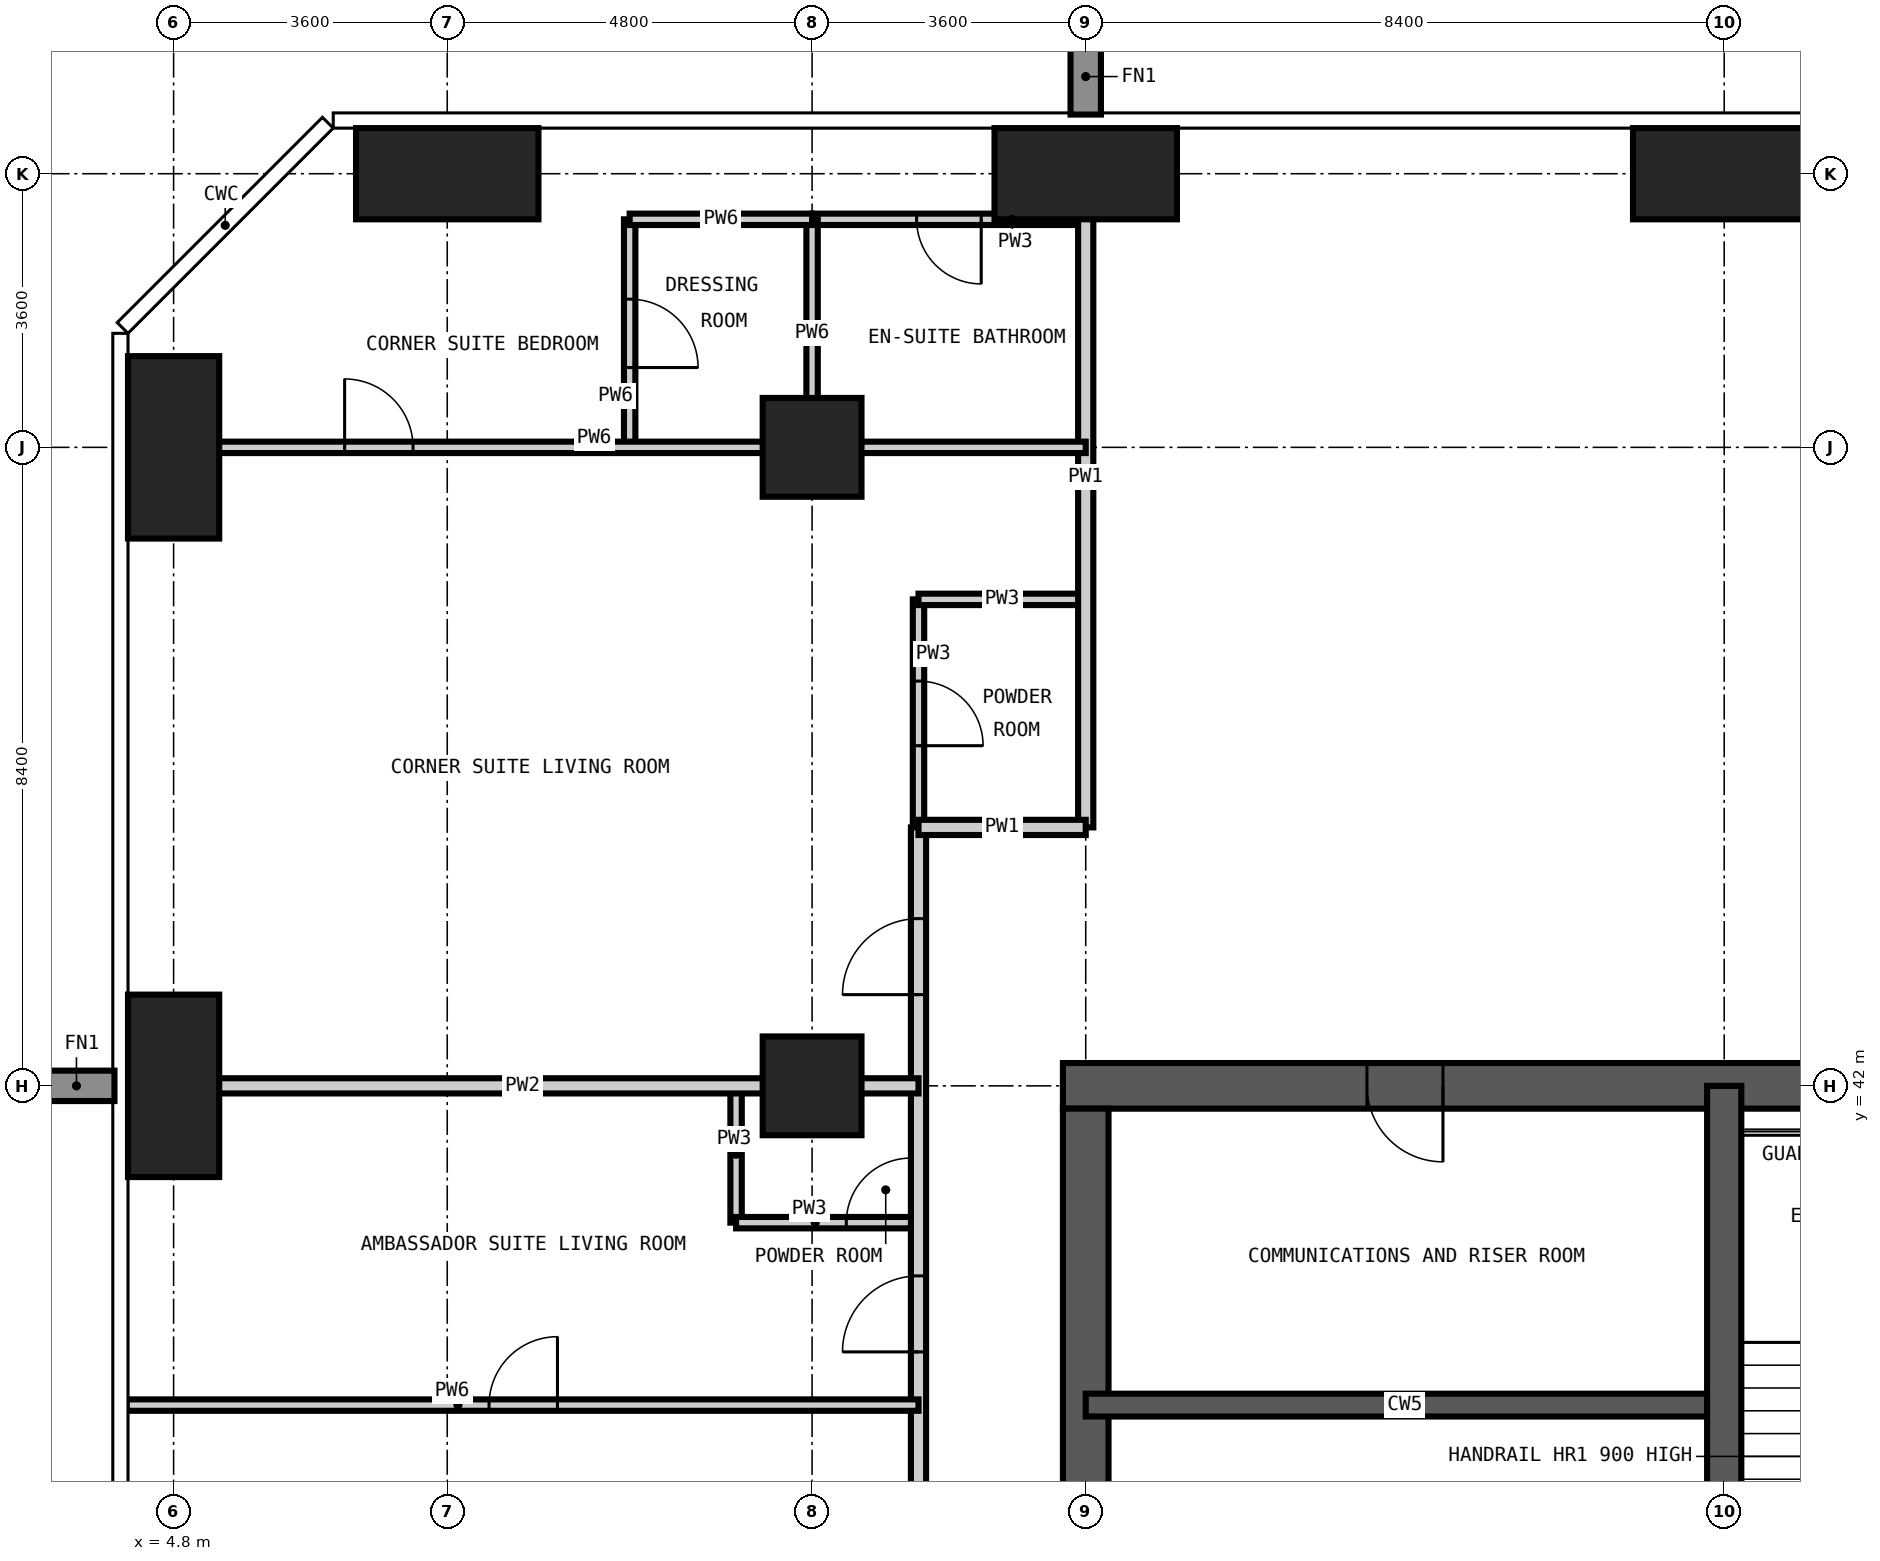
"""IFC4 building model, lengths in metres.
Left out: names, types, materials, properties, quantities, classifications, styles, units other than length and angle.
Written with IfcOpenShell. Run it as: python <this file> out.ifc"""

import sys

from ifc_helpers import new_model, si_unit, direction, frame, frame_2d, origin, origin_2d, place, context, subcontext, project, spatial, rectangle, extrude, element, fill, save


model = new_model("IFC4")
c1 = context("Model", 3, precision=1e-05, world=origin(), true_north=direction((0.0, 1.0)))
c2 = subcontext(c1, "Body", "Model", "MODEL_VIEW")
j1 = project(units=[si_unit("LENGTHUNIT", "METRE"), si_unit("PLANEANGLEUNIT", "RADIAN")], contexts=[c1])
p1 = place(None, origin())
s1 = spatial("IfcSite", under=j1, at=p1, CompositionType="ELEMENT")
p2 = place(p1, origin())
s2 = spatial("IfcBuilding", under=s1, at=p2, CompositionType="ELEMENT")
p3 = place(p2, frame((0.0, 0.0, 205.8)))
s3 = spatial("IfcBuildingStorey", under=s2, at=p3, CompositionType="ELEMENT", Elevation=205.8)
for number, where, z_axis, x_axis in (
    (1, (4.8, 42.0, -0.35), (0.0, 0.0, 1.0), (1.0, 0.0, 0.0)),
    (2, (4.8, 50.4, -0.35), (0.0, 0.0, 1.0), (1.0, 0.0, 0.0)),
):
    element("IfcColumn", number, at=place(p3, frame(where, z_axis=z_axis, x_axis=x_axis)), inside=s3, PredefinedType="COLUMN", context=c2, shape_type="SweptSolid", body=[
        extrude(rectangle(XDim=1.2, YDim=2.4, at=origin_2d()), origin(), (0.0, 0.0, 1.0), 3.6),
    ])
p4 = place(p3, frame((8.4, 54.0, -0.35), z_axis=(0.0, 0.0, 1.0), x_axis=(1.0, 0.0, 0.0)))
e3 = element("IfcColumn", 3, at=p4, inside=s3, PredefinedType="COLUMN", context=c2, shape_type="SweptSolid", body=[
    extrude(rectangle(XDim=2.4, YDim=1.2, at=origin_2d()), origin(), (0.0, 0.0, 1.0), 3.6),
])
for number, where, z_axis, x_axis in (
    (4, (13.2, 42.0, -0.35), (0.0, 0.0, 1.0), (1.0, 0.0, 0.0)),
    (5, (13.2, 50.4, -0.35), (0.0, 0.0, 1.0), (1.0, 0.0, 0.0)),
):
    element("IfcColumn", number, at=place(p3, frame(where, z_axis=z_axis, x_axis=x_axis)), inside=s3, PredefinedType="COLUMN", context=c2, shape_type="SweptSolid", body=[
        extrude(rectangle(XDim=1.3, YDim=1.3, at=origin_2d()), origin(), (0.0, 0.0, 1.0), 3.6),
    ])
for number, where, z_axis, x_axis in (
    (6, (16.8, 54.0, -0.35), (0.0, 0.0, 1.0), (1.0, 0.0, 0.0)),
    (7, (25.2, 54.0, -0.35), (0.0, 0.0, 1.0), (1.0, 0.0, 0.0)),
):
    element("IfcColumn", number, at=place(p3, frame(where, z_axis=z_axis, x_axis=x_axis)), inside=s3, PredefinedType="COLUMN", context=c2, shape_type="SweptSolid", body=[
        extrude(rectangle(XDim=2.4, YDim=1.2, at=origin_2d()), origin(), (0.0, 0.0, 1.0), 3.6),
    ])
p5 = place(p3, frame((42.3, 42.0, -0.35), z_axis=(0.0, 0.0, 1.0), x_axis=(-1.0, 0.0, 0.0)))
e8 = element("IfcWall", 8, at=p5, inside=s3, PredefinedType="SHEAR", context=c2, shape_type="SweptSolid", body=[
    extrude(rectangle(XDim=25.8, YDim=0.6, at=frame_2d((12.9, 0.0))), origin(), (0.0, 0.0, 1.0), 3.6),
])
p6 = place(p5, frame((20.8, 0.0, 0.35)))
e9 = element("IfcOpeningElement", 9, at=p6, cuts=e8, PredefinedType="OPENING", context=c2, shape_type="SweptSolid", body=[
    extrude(rectangle(XDim=1.0, YDim=2.1, at=frame_2d((0.5, 1.05))), frame((0.0, 0.31, 0.0), z_axis=(0.0, -1.0, 0.0), x_axis=(1.0, 0.0, 0.0)), (0.0, 0.0, 1.0), 0.62),
])
p7 = place(p5, frame((10.2, 0.0, 0.35)))
e10 = element("IfcOpeningElement", 10, at=p7, cuts=e8, PredefinedType="OPENING", context=c2, shape_type="SweptSolid", body=[
    extrude(rectangle(XDim=1.2, YDim=2.2, at=frame_2d((0.6, 1.1))), frame((0.0, 0.31, 0.0), z_axis=(0.0, -1.0, 0.0), x_axis=(1.0, 0.0, 0.0)), (0.0, 0.0, 1.0), 0.62),
])
p8 = place(p3, frame((16.8, 41.7, -0.35), z_axis=(0.0, 0.0, 1.0), x_axis=(0.0, -1.0, 0.0)))
e11 = element("IfcWall", 11, at=p8, inside=s3, PredefinedType="SHEAR", context=c2, shape_type="SweptSolid", body=[
    extrude(rectangle(XDim=24.6, YDim=0.6, at=frame_2d((12.3, 0.0))), origin(), (0.0, 0.0, 1.0), 3.6),
])
p9 = place(p8, frame((11.4, 0.0, 0.35)))
e12 = element("IfcOpeningElement", 12, at=p9, cuts=e11, PredefinedType="OPENING", context=c2, shape_type="SweptSolid", body=[
    extrude(rectangle(XDim=1.8, YDim=2.2, at=frame_2d((0.9, 1.1))), frame((0.0, 0.31, 0.0), z_axis=(0.0, -1.0, 0.0), x_axis=(1.0, 0.0, 0.0)), (0.0, 0.0, 1.0), 0.62),
])
p10 = place(p8, frame((20.2, 0.0, 0.35)))
e13 = element("IfcOpeningElement", 13, at=p10, cuts=e11, PredefinedType="OPENING", context=c2, shape_type="SweptSolid", body=[
    extrude(rectangle(XDim=1.0, YDim=2.1, at=frame_2d((0.5, 1.05))), frame((0.0, 0.31, 0.0), z_axis=(0.0, -1.0, 0.0), x_axis=(1.0, 0.0, 0.0)), (0.0, 0.0, 1.0), 0.62),
])
p11 = place(p8, frame((5.5, 0.0, 0.35)))
e14 = element("IfcOpeningElement", 14, at=p11, cuts=e11, PredefinedType="OPENING", context=c2, shape_type="SweptSolid", body=[
    extrude(rectangle(XDim=1.0, YDim=2.1, at=frame_2d((0.5, 1.05))), frame((0.0, 0.31, 0.0), z_axis=(0.0, -1.0, 0.0), x_axis=(1.0, 0.0, 0.0)), (0.0, 0.0, 1.0), 0.62),
])
p12 = place(p3, frame((16.8, 37.8, -0.35), z_axis=(0.0, 0.0, 1.0), x_axis=(1.0, 0.0, 0.0)))
e15 = element("IfcWall", 15, at=p12, inside=s3, PredefinedType="SHEAR", context=c2, shape_type="SweptSolid", body=[
    extrude(rectangle(XDim=8.4, YDim=0.3, at=frame_2d((4.2, 0.0))), origin(), (0.0, 0.0, 1.0), 3.6),
])
p13 = place(p3, frame((25.2, 16.8, -0.35), z_axis=(0.0, 0.0, 1.0), x_axis=(0.0, 1.0, 0.0)))
e16 = element("IfcWall", 16, at=p13, inside=s3, PredefinedType="SHEAR", context=c2, shape_type="SweptSolid", body=[
    extrude(rectangle(XDim=25.2, YDim=0.45, at=frame_2d((12.6, 0.0))), origin(), (0.0, 0.0, 1.0), 3.6),
])
p14 = place(p3, frame((12.2, 40.2, 0.0), z_axis=(0.0, 0.0, 1.0), x_axis=(0.0, 1.0, 0.0)))
e17 = element("IfcWall", 17, at=p14, inside=s3, PredefinedType="PARTITIONING", context=c2, shape_type="SweptSolid", body=[
    extrude(rectangle(XDim=1.8, YDim=0.15, at=frame_2d((0.9, 0.0))), origin(), (0.0, 0.0, 1.0), 3.25),
])
p15 = place(p3, frame((14.6, 45.4, 0.0), z_axis=(0.0, 0.0, 1.0), x_axis=(0.0, 1.0, 0.0)))
e18 = element("IfcWall", 18, at=p15, inside=s3, PredefinedType="PARTITIONING", context=c2, shape_type="SweptSolid", body=[
    extrude(rectangle(XDim=3.0, YDim=0.15, at=frame_2d((1.5, 0.0))), origin(), (0.0, 0.0, 1.0), 3.25),
])
p16 = place(p15, frame((1.075, 0.0, 0.0)))
e19 = element("IfcOpeningElement", 19, at=p16, cuts=e18, PredefinedType="OPENING", context=c2, shape_type="SweptSolid", body=[
    extrude(rectangle(XDim=0.85, YDim=2.1, at=frame_2d((0.425, 1.05))), frame((0.0, 0.085, 0.0), z_axis=(0.0, -1.0, 0.0), x_axis=(1.0, 0.0, 0.0)), (0.0, 0.0, 1.0), 0.17),
])
p17 = place(p3, frame((12.2, 40.2, 0.0), z_axis=(0.0, 0.0, 1.0), x_axis=(1.0, 0.0, 0.0)))
e20 = element("IfcWall", 20, at=p17, inside=s3, PredefinedType="PARTITIONING", context=c2, shape_type="SweptSolid", body=[
    extrude(rectangle(XDim=2.4, YDim=0.15, at=frame_2d((1.2, 0.0))), origin(), (0.0, 0.0, 1.0), 3.25),
])
p18 = place(p17, frame((1.45, 0.0, 0.0)))
e21 = element("IfcOpeningElement", 21, at=p18, cuts=e20, PredefinedType="OPENING", context=c2, shape_type="SweptSolid", body=[
    extrude(rectangle(XDim=0.85, YDim=2.1, at=frame_2d((0.425, 1.05))), frame((0.0, 0.085, 0.0), z_axis=(0.0, -1.0, 0.0), x_axis=(1.0, 0.0, 0.0)), (0.0, 0.0, 1.0), 0.17),
])
p19 = place(p3, frame((14.6, 48.4, 0.0), z_axis=(0.0, 0.0, 1.0), x_axis=(1.0, 0.0, 0.0)))
e22 = element("IfcWall", 22, at=p19, inside=s3, PredefinedType="PARTITIONING", context=c2, shape_type="SweptSolid", body=[
    extrude(rectangle(XDim=2.2, YDim=0.15, at=frame_2d((1.1, 0.0))), origin(), (0.0, 0.0, 1.0), 3.25),
])
p20 = place(p3, frame((13.2, 53.4, 0.0), z_axis=(0.0, 0.0, 1.0), x_axis=(1.0, 0.0, 0.0)))
e23 = element("IfcWall", 23, at=p20, inside=s3, PredefinedType="PARTITIONING", context=c2, shape_type="SweptSolid", body=[
    extrude(rectangle(XDim=3.6, YDim=0.15, at=frame_2d((1.8, 0.0))), origin(), (0.0, 0.0, 1.0), 3.25),
])
p21 = place(p20, frame((1.375, 0.0, 0.0)))
e24 = element("IfcOpeningElement", 24, at=p21, cuts=e23, PredefinedType="OPENING", context=c2, shape_type="SweptSolid", body=[
    extrude(rectangle(XDim=0.85, YDim=2.1, at=frame_2d((0.425, 1.05))), frame((0.0, 0.085, 0.0), z_axis=(0.0, -1.0, 0.0), x_axis=(1.0, 0.0, 0.0)), (0.0, 0.0, 1.0), 0.17),
])
p22 = place(p3, frame((14.6, 29.4, 0.0), z_axis=(0.0, 0.0, 1.0), x_axis=(0.0, 1.0, 0.0)))
e25 = element("IfcWall", 25, at=p22, inside=s3, PredefinedType="PARTITIONING", context=c2, shape_type="SweptSolid", body=[
    extrude(rectangle(XDim=16.0, YDim=0.2, at=frame_2d((8.0, 0.0))), origin(), (0.0, 0.0, 1.0), 3.25),
])
p23 = place(p22, frame((9.1, 0.0, 0.0)))
e26 = element("IfcOpeningElement", 26, at=p23, cuts=e25, PredefinedType="OPENING", context=c2, shape_type="SweptSolid", body=[
    extrude(rectangle(XDim=1.0, YDim=2.2, at=frame_2d((0.5, 1.1))), frame((0.0, 0.11, 0.0), z_axis=(0.0, -1.0, 0.0), x_axis=(1.0, 0.0, 0.0)), (0.0, 0.0, 1.0), 0.22),
])
p24 = place(p22, frame((13.8, 0.0, 0.0)))
e27 = element("IfcOpeningElement", 27, at=p24, cuts=e25, PredefinedType="OPENING", context=c2, shape_type="SweptSolid", body=[
    extrude(rectangle(XDim=1.0, YDim=2.2, at=frame_2d((0.5, 1.1))), frame((0.0, 0.11, 0.0), z_axis=(0.0, -1.0, 0.0), x_axis=(1.0, 0.0, 0.0)), (0.0, 0.0, 1.0), 0.22),
])
p25 = place(p3, frame((16.8, 45.4, 0.0), z_axis=(0.0, 0.0, 1.0), x_axis=(0.0, 1.0, 0.0)))
e28 = element("IfcWall", 28, at=p25, inside=s3, PredefinedType="PARTITIONING", context=c2, shape_type="SweptSolid", body=[
    extrude(rectangle(XDim=9.218, YDim=0.2, at=frame_2d((4.609, 0.0))), origin(), (0.0, 0.0, 1.0), 3.25),
])
p26 = place(p3, frame((14.6, 45.4, 0.0), z_axis=(0.0, 0.0, 1.0), x_axis=(1.0, 0.0, 0.0)))
e29 = element("IfcWall", 29, at=p26, inside=s3, PredefinedType="PARTITIONING", context=c2, shape_type="SweptSolid", body=[
    extrude(rectangle(XDim=2.2, YDim=0.2, at=frame_2d((1.1, 0.0))), origin(), (0.0, 0.0, 1.0), 3.25),
])
p27 = place(p3, frame((4.182, 42.0, 0.0), z_axis=(0.0, 0.0, 1.0), x_axis=(1.0, 0.0, 0.0)))
e30 = element("IfcWall", 30, at=p27, inside=s3, PredefinedType="PARTITIONING", context=c2, shape_type="SweptSolid", body=[
    extrude(rectangle(XDim=10.418, YDim=0.2, at=frame_2d((5.209, 0.0))), origin(), (0.0, 0.0, 1.0), 3.25),
])
p28 = place(p3, frame((10.8, 50.4, 0.0), z_axis=(0.0, 0.0, 1.0), x_axis=(0.0, 1.0, 0.0)))
e31 = element("IfcWall", 31, at=p28, inside=s3, PredefinedType="PARTITIONING", context=c2, shape_type="SweptSolid", body=[
    extrude(rectangle(XDim=3.0, YDim=0.15, at=frame_2d((1.5, 0.0))), origin(), (0.0, 0.0, 1.0), 3.25),
])
p29 = place(p28, frame((1.05, 0.0, 0.0)))
e32 = element("IfcOpeningElement", 32, at=p29, cuts=e31, PredefinedType="OPENING", context=c2, shape_type="SweptSolid", body=[
    extrude(rectangle(XDim=0.9, YDim=2.1, at=frame_2d((0.45, 1.05))), frame((0.0, 0.085, 0.0), z_axis=(0.0, -1.0, 0.0), x_axis=(1.0, 0.0, 0.0)), (0.0, 0.0, 1.0), 0.17),
])
p30 = place(p3, frame((13.2, 50.4, 0.0), z_axis=(0.0, 0.0, 1.0), x_axis=(0.0, 1.0, 0.0)))
e33 = element("IfcWall", 33, at=p30, inside=s3, PredefinedType="PARTITIONING", context=c2, shape_type="SweptSolid", body=[
    extrude(rectangle(XDim=3.0, YDim=0.15, at=frame_2d((1.5, 0.0))), origin(), (0.0, 0.0, 1.0), 3.25),
])
p31 = place(p3, frame((4.182, 37.8, 0.0), z_axis=(0.0, 0.0, 1.0), x_axis=(1.0, 0.0, 0.0)))
e34 = element("IfcWall", 34, at=p31, inside=s3, PredefinedType="PARTITIONING", context=c2, shape_type="SweptSolid", body=[
    extrude(rectangle(XDim=10.418, YDim=0.15, at=frame_2d((5.209, 0.0))), origin(), (0.0, 0.0, 1.0), 3.25),
])
p32 = place(p31, frame((4.768, 0.0, 0.0)))
e35 = element("IfcOpeningElement", 35, at=p32, cuts=e34, PredefinedType="OPENING", context=c2, shape_type="SweptSolid", body=[
    extrude(rectangle(XDim=0.9, YDim=2.1, at=frame_2d((0.45, 1.05))), frame((0.0, 0.085, 0.0), z_axis=(0.0, -1.0, 0.0), x_axis=(1.0, 0.0, 0.0)), (0.0, 0.0, 1.0), 0.17),
])
p33 = place(p3, frame((4.182, 50.4, 0.0), z_axis=(0.0, 0.0, 1.0), x_axis=(1.0, 0.0, 0.0)))
e36 = element("IfcWall", 36, at=p33, inside=s3, PredefinedType="PARTITIONING", context=c2, shape_type="SweptSolid", body=[
    extrude(rectangle(XDim=12.618, YDim=0.15, at=frame_2d((6.309, 0.0))), origin(), (0.0, 0.0, 1.0), 3.25),
])
p34 = place(p33, frame((2.868, 0.0, 0.0)))
e37 = element("IfcOpeningElement", 37, at=p34, cuts=e36, PredefinedType="OPENING", context=c2, shape_type="SweptSolid", body=[
    extrude(rectangle(XDim=0.9, YDim=2.1, at=frame_2d((0.45, 1.05))), frame((0.0, 0.085, 0.0), z_axis=(0.0, -1.0, 0.0), x_axis=(1.0, 0.0, 0.0)), (0.0, 0.0, 1.0), 0.17),
])
p35 = place(p3, frame((10.8, 53.4, 0.0), z_axis=(0.0, 0.0, 1.0), x_axis=(1.0, 0.0, 0.0)))
e38 = element("IfcWall", 38, at=p35, inside=s3, PredefinedType="PARTITIONING", context=c2, shape_type="SweptSolid", body=[
    extrude(rectangle(XDim=2.4, YDim=0.15, at=frame_2d((1.2, 0.0))), origin(), (0.0, 0.0, 1.0), 3.25),
])
p36 = place(p23, origin())
e39 = element("IfcDoor", 39, at=p36, inside=s3, OperationType="SINGLE_SWING_LEFT", PredefinedType="DOOR", context=c2, shape_type="SweptSolid", body=[
    extrude(rectangle(XDim=1.0, YDim=2.2, at=frame_2d((0.5, 1.1))), frame((0.0, 0.025, 0.0), z_axis=(0.0, -1.0, 0.0), x_axis=(1.0, 0.0, 0.0)), (0.0, 0.0, 1.0), 0.05),
])
fill(e26, e39)
p37 = place(p18, origin())
e40 = element("IfcDoor", 40, at=p37, inside=s3, OperationType="SINGLE_SWING_RIGHT", PredefinedType="DOOR", context=c2, shape_type="SweptSolid", body=[
    extrude(rectangle(XDim=0.85, YDim=2.1, at=frame_2d((0.425, 1.05))), frame((0.0, 0.025, 0.0), z_axis=(0.0, -1.0, 0.0), x_axis=(1.0, 0.0, 0.0)), (0.0, 0.0, 1.0), 0.05),
])
fill(e21, e40)
p38 = place(p32, origin())
e41 = element("IfcDoor", 41, at=p38, inside=s3, OperationType="SINGLE_SWING_RIGHT", PredefinedType="DOOR", context=c2, shape_type="SweptSolid", body=[
    extrude(rectangle(XDim=0.9, YDim=2.1, at=frame_2d((0.45, 1.05))), frame((0.0, 0.025, 0.0), z_axis=(0.0, -1.0, 0.0), x_axis=(1.0, 0.0, 0.0)), (0.0, 0.0, 1.0), 0.05),
])
fill(e35, e41)
p39 = place(p24, origin())
e42 = element("IfcDoor", 42, at=p39, inside=s3, OperationType="SINGLE_SWING_LEFT", PredefinedType="DOOR", context=c2, shape_type="SweptSolid", body=[
    extrude(rectangle(XDim=1.0, YDim=2.2, at=frame_2d((0.5, 1.1))), frame((0.0, 0.025, 0.0), z_axis=(0.0, -1.0, 0.0), x_axis=(1.0, 0.0, 0.0)), (0.0, 0.0, 1.0), 0.05),
])
fill(e27, e42)
p40 = place(p16, frame((0.85, 0.0, 0.0), z_axis=(0.0, 0.0, 1.0), x_axis=(-1.0, 0.0, 0.0)))
e43 = element("IfcDoor", 43, at=p40, inside=s3, OperationType="SINGLE_SWING_RIGHT", PredefinedType="DOOR", context=c2, shape_type="SweptSolid", body=[
    extrude(rectangle(XDim=0.85, YDim=2.1, at=frame_2d((0.425, 1.05))), frame((0.0, 0.025, 0.0), z_axis=(0.0, -1.0, 0.0), x_axis=(1.0, 0.0, 0.0)), (0.0, 0.0, 1.0), 0.05),
])
fill(e19, e43)
p41 = place(p34, origin())
e44 = element("IfcDoor", 44, at=p41, inside=s3, OperationType="SINGLE_SWING_LEFT", PredefinedType="DOOR", context=c2, shape_type="SweptSolid", body=[
    extrude(rectangle(XDim=0.9, YDim=2.1, at=frame_2d((0.45, 1.05))), frame((0.0, 0.025, 0.0), z_axis=(0.0, -1.0, 0.0), x_axis=(1.0, 0.0, 0.0)), (0.0, 0.0, 1.0), 0.05),
])
fill(e37, e44)
p42 = place(p21, frame((0.85, 0.0, 0.0), z_axis=(0.0, 0.0, 1.0), x_axis=(-1.0, 0.0, 0.0)))
e45 = element("IfcDoor", 45, at=p42, inside=s3, OperationType="SINGLE_SWING_LEFT", PredefinedType="DOOR", context=c2, shape_type="SweptSolid", body=[
    extrude(rectangle(XDim=0.85, YDim=2.1, at=frame_2d((0.425, 1.05))), frame((0.0, 0.025, 0.0), z_axis=(0.0, -1.0, 0.0), x_axis=(1.0, 0.0, 0.0)), (0.0, 0.0, 1.0), 0.05),
])
fill(e24, e45)
p43 = place(p29, frame((0.9, 0.0, 0.0), z_axis=(0.0, 0.0, 1.0), x_axis=(-1.0, 0.0, 0.0)))
e46 = element("IfcDoor", 46, at=p43, inside=s3, OperationType="SINGLE_SWING_RIGHT", PredefinedType="DOOR", context=c2, shape_type="SweptSolid", body=[
    extrude(rectangle(XDim=0.9, YDim=2.1, at=frame_2d((0.45, 1.05))), frame((0.0, 0.025, 0.0), z_axis=(0.0, -1.0, 0.0), x_axis=(1.0, 0.0, 0.0)), (0.0, 0.0, 1.0), 0.05),
])
fill(e32, e46)
p44 = place(p6, origin())
e47 = element("IfcDoor", 47, at=p44, inside=s3, OperationType="SINGLE_SWING_LEFT", PredefinedType="DOOR", context=c2, shape_type="SweptSolid", body=[
    extrude(rectangle(XDim=1.0, YDim=2.1, at=frame_2d((0.5, 1.05))), frame((0.0, 0.025, 0.0), z_axis=(0.0, -1.0, 0.0), x_axis=(1.0, 0.0, 0.0)), (0.0, 0.0, 1.0), 0.05),
])
fill(e9, e47)
save(model, sys.argv[1])
